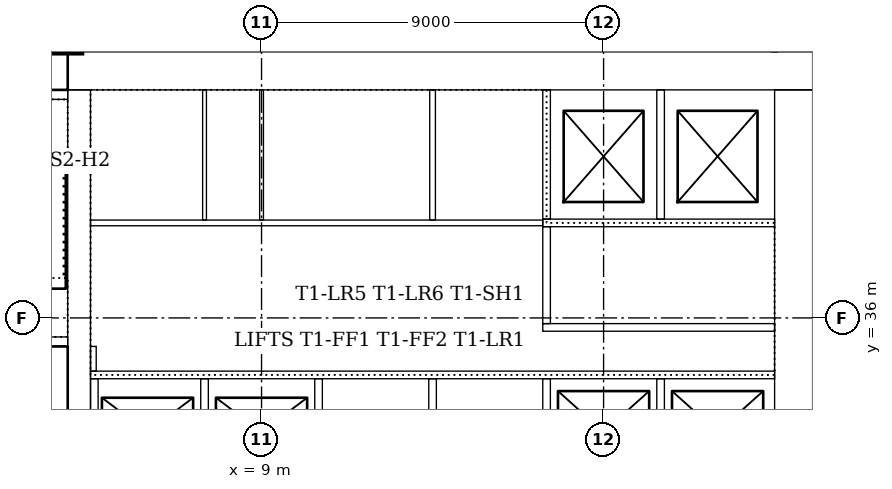
"""IFC4 building model, lengths in metres.
Left out: names, types, materials, properties, quantities, classifications, styles, units other than length and angle.
Written with IfcOpenShell. Run it as: python <this file> out.ifc"""

import sys

from ifc_helpers import new_model, si_unit, direction, frame, frame_2d, origin, origin_2d, place, context, subcontext, project, spatial, rectangle, extrude, element, fill, save


model = new_model("IFC4")
c1 = context("Model", 3, precision=1e-05, world=origin(), true_north=direction((0.0, 1.0)))
c2 = subcontext(c1, "Body", "Model", "MODEL_VIEW")
j1 = project(units=[si_unit("LENGTHUNIT", "METRE"), si_unit("PLANEANGLEUNIT", "RADIAN")], contexts=[c1])
p1 = place(None, origin())
s1 = spatial("IfcSite", under=j1, at=p1, CompositionType="ELEMENT")
p2 = place(p1, origin())
s2 = spatial("IfcBuilding", under=s1, at=p2, CompositionType="ELEMENT")
p3 = place(p2, frame((0.0, 0.0, 26.0)))
s3 = spatial("IfcBuildingStorey", under=s2, at=p3, CompositionType="ELEMENT", Elevation=26.0)
p4 = place(p3, frame((23.5, 42.5, 0.0), z_axis=(0.0, 0.0, 1.0), x_axis=(-1.0, 0.0, 0.0)))
e1 = element("IfcWall", 1, at=p4, inside=s3, PredefinedType="SOLIDWALL", context=c2, shape_type="SweptSolid", body=[
    extrude(rectangle(XDim=19.6, YDim=1.0, at=frame_2d((9.8, 0.0))), origin(), (0.0, 0.0, 1.0), 4.0),
])
p5 = place(p3, frame((23.0, 31.5, 0.0), z_axis=(0.0, 0.0, 1.0), x_axis=(0.0, 1.0, 0.0)))
e2 = element("IfcWall", 2, at=p5, inside=s3, PredefinedType="SOLIDWALL", context=c2, shape_type="SweptSolid", body=[
    extrude(rectangle(XDim=10.5, YDim=1.0, at=frame_2d((5.25, 0.0))), origin(), (0.0, 0.0, 1.0), 4.0),
])
p6 = place(p5, frame((3.15, 0.0, 0.0)))
e3 = element("IfcOpeningElement", 3, at=p6, cuts=e2, PredefinedType="OPENING", context=c2, shape_type="SweptSolid", body=[
    extrude(rectangle(XDim=1.0, YDim=2.1, at=frame_2d((0.5, 1.05))), frame((0.0, 0.51, 0.0), z_axis=(0.0, -1.0, 0.0), x_axis=(1.0, 0.0, 0.0)), (0.0, 0.0, 1.0), 1.02),
])
p7 = place(p5, frame((5.2, 0.0, 0.0)))
e4 = element("IfcOpeningElement", 4, at=p7, cuts=e2, PredefinedType="OPENING", context=c2, shape_type="SweptSolid", body=[
    extrude(rectangle(XDim=1.0, YDim=2.1, at=frame_2d((0.5, 1.05))), frame((0.0, 0.51, 0.0), z_axis=(0.0, -1.0, 0.0), x_axis=(1.0, 0.0, 0.0)), (0.0, 0.0, 1.0), 1.02),
])
p8 = place(p3, frame((4.2, 42.0, 0.0), z_axis=(0.0, 0.0, 1.0), x_axis=(0.0, -1.0, 0.0)))
e5 = element("IfcWall", 5, at=p8, inside=s3, PredefinedType="SOLIDWALL", context=c2, shape_type="SweptSolid", body=[
    extrude(rectangle(XDim=10.5, YDim=0.6, at=frame_2d((5.25, 0.0))), origin(), (0.0, 0.0, 1.0), 4.0),
])
p9 = place(p8, frame((5.3, 0.0, 0.0)))
e6 = element("IfcOpeningElement", 6, at=p9, cuts=e5, PredefinedType="OPENING", context=c2, shape_type="SweptSolid", body=[
    extrude(rectangle(XDim=1.0, YDim=2.1, at=frame_2d((0.5, 1.05))), frame((0.0, 0.31, 0.0), z_axis=(0.0, -1.0, 0.0), x_axis=(1.0, 0.0, 0.0)), (0.0, 0.0, 1.0), 0.62),
])
p10 = place(p3, frame((0.36, 35.375, 0.0), z_axis=(0.0, 0.0, 1.0), x_axis=(1.0, 0.0, 0.0)))
e7 = element("IfcWall", 7, at=p10, inside=s3, PredefinedType="SOLIDWALL", context=c2, shape_type="SweptSolid", body=[
    extrude(rectangle(XDim=3.54, YDim=0.25, at=frame_2d((1.77, 0.0))), origin(), (0.0, 0.0, 1.0), 4.0),
])
p11 = place(p10, frame((2.14, 0.0, 0.0)))
e8 = element("IfcOpeningElement", 8, at=p11, cuts=e7, PredefinedType="OPENING", context=c2, shape_type="SweptSolid", body=[
    extrude(rectangle(XDim=1.0, YDim=2.1, at=frame_2d((0.5, 1.05))), frame((0.0, 0.135, 0.0), z_axis=(0.0, -1.0, 0.0), x_axis=(1.0, 0.0, 0.0)), (0.0, 0.0, 1.0), 0.27),
])
p12 = place(p3, frame((3.9, 41.875, 0.0), z_axis=(0.0, 0.0, 1.0), x_axis=(-1.0, 0.0, 0.0)))
e9 = element("IfcWall", 9, at=p12, inside=s3, PredefinedType="SOLIDWALL", context=c2, shape_type="SweptSolid", body=[
    extrude(rectangle(XDim=3.54, YDim=0.25, at=frame_2d((1.77, 0.0))), origin(), (0.0, 0.0, 1.0), 4.0),
])
p13 = place(p3, frame((3.667, 43.574, 0.0), z_axis=(0.0, 0.0, 1.0), x_axis=(1.0, 0.0, 0.0)))
e10 = element("IfcColumn", 10, at=p13, inside=s3, PredefinedType="COLUMN", context=c2, shape_type="SweptSolid", body=[
    extrude(rectangle(XDim=1.2, YDim=1.2, at=origin_2d()), origin(), (0.0, 0.0, 1.0), 3.85),
])
p14 = place(p3, frame((16.4, 35.75, 0.0), z_axis=(0.0, 0.0, 1.0), x_axis=(1.0, 0.0, 0.0)))
e11 = element("IfcWall", 11, at=p14, inside=s3, PredefinedType="PARTITIONING", context=c2, shape_type="SweptSolid", body=[
    extrude(rectangle(XDim=6.1, YDim=0.2, at=frame_2d((3.05, 0.0))), origin(), (0.0, 0.0, 1.0), 3.85),
])
p15 = place(p3, frame((16.4, 38.5, 0.0), z_axis=(0.0, 0.0, 1.0), x_axis=(1.0, 0.0, 0.0)))
e12 = element("IfcWall", 12, at=p15, inside=s3, PredefinedType="PARTITIONING", context=c2, shape_type="SweptSolid", body=[
    extrude(rectangle(XDim=6.1, YDim=0.2, at=frame_2d((3.05, 0.0))), origin(), (0.0, 0.0, 1.0), 3.85),
])
p16 = place(p15, frame((1.0, 0.0, 0.0)))
e13 = element("IfcOpeningElement", 13, at=p16, cuts=e12, PredefinedType="OPENING", context=c2, shape_type="SweptSolid", body=[
    extrude(rectangle(XDim=1.2, YDim=2.1, at=frame_2d((0.6, 1.05))), frame((0.0, 0.11, 0.0), z_axis=(0.0, -1.0, 0.0), x_axis=(1.0, 0.0, 0.0)), (0.0, 0.0, 1.0), 0.22),
])
p17 = place(p15, frame((4.0, 0.0, 0.0)))
e14 = element("IfcOpeningElement", 14, at=p17, cuts=e12, PredefinedType="OPENING", context=c2, shape_type="SweptSolid", body=[
    extrude(rectangle(XDim=1.2, YDim=2.1, at=frame_2d((0.6, 1.05))), frame((0.0, 0.11, 0.0), z_axis=(0.0, -1.0, 0.0), x_axis=(1.0, 0.0, 0.0)), (0.0, 0.0, 1.0), 0.22),
])
p18 = place(p3, frame((16.5, 35.85, 0.0), z_axis=(0.0, 0.0, 1.0), x_axis=(0.0, 1.0, 0.0)))
e15 = element("IfcWall", 15, at=p18, inside=s3, PredefinedType="PARTITIONING", context=c2, shape_type="SweptSolid", body=[
    extrude(rectangle(XDim=2.55, YDim=0.2, at=frame_2d((1.275, 0.0))), origin(), (0.0, 0.0, 1.0), 3.85),
])
p19 = place(p3, frame((4.5, 34.5, 0.0), z_axis=(0.0, 0.0, 1.0), x_axis=(1.0, 0.0, 0.0)))
e16 = element("IfcWall", 16, at=p19, inside=s3, PredefinedType="PARTITIONING", context=c2, shape_type="SweptSolid", body=[
    extrude(rectangle(XDim=18.0, YDim=0.2, at=frame_2d((9.0, 0.0))), origin(), (0.0, 0.0, 1.0), 3.85),
])
p20 = place(p19, frame((0.95, 0.0, 0.0)))
e17 = element("IfcOpeningElement", 17, at=p20, cuts=e16, PredefinedType="OPENING", context=c2, shape_type="SweptSolid", body=[
    extrude(rectangle(XDim=1.1, YDim=2.1, at=frame_2d((0.55, 1.05))), frame((0.0, 0.11, 0.0), z_axis=(0.0, -1.0, 0.0), x_axis=(1.0, 0.0, 0.0)), (0.0, 0.0, 1.0), 0.22),
])
p21 = place(p19, frame((3.95, 0.0, 0.0)))
e18 = element("IfcOpeningElement", 18, at=p21, cuts=e16, PredefinedType="OPENING", context=c2, shape_type="SweptSolid", body=[
    extrude(rectangle(XDim=1.1, YDim=2.1, at=frame_2d((0.55, 1.05))), frame((0.0, 0.11, 0.0), z_axis=(0.0, -1.0, 0.0), x_axis=(1.0, 0.0, 0.0)), (0.0, 0.0, 1.0), 0.22),
])
p22 = place(p19, frame((12.95, 0.0, 0.0)))
e19 = element("IfcOpeningElement", 19, at=p22, cuts=e16, PredefinedType="OPENING", context=c2, shape_type="SweptSolid", body=[
    extrude(rectangle(XDim=1.1, YDim=2.1, at=frame_2d((0.55, 1.05))), frame((0.0, 0.11, 0.0), z_axis=(0.0, -1.0, 0.0), x_axis=(1.0, 0.0, 0.0)), (0.0, 0.0, 1.0), 0.22),
])
p23 = place(p19, frame((15.95, 0.0, 0.0)))
e20 = element("IfcOpeningElement", 20, at=p23, cuts=e16, PredefinedType="OPENING", context=c2, shape_type="SweptSolid", body=[
    extrude(rectangle(XDim=1.1, YDim=2.1, at=frame_2d((0.55, 1.05))), frame((0.0, 0.11, 0.0), z_axis=(0.0, -1.0, 0.0), x_axis=(1.0, 0.0, 0.0)), (0.0, 0.0, 1.0), 0.22),
])
for number, where, z_axis, x_axis in (
    (21, (16.5, 38.6, 0.0), (0.0, 0.0, 1.0), (0.0, 1.0, 0.0)),
    (22, (19.5, 38.6, 0.0), (0.0, 0.0, 1.0), (0.0, 1.0, 0.0)),
):
    element("IfcWall", number, at=place(p3, frame(where, z_axis=z_axis, x_axis=x_axis)), inside=s3, PredefinedType="PARTITIONING", context=c2, shape_type="SweptSolid", body=[
        extrude(rectangle(XDim=3.4, YDim=0.2, at=frame_2d((1.7, 0.0))), origin(), (0.0, 0.0, 1.0), 3.85),
    ])
for number, where, z_axis, x_axis in (
    (23, (4.6, 31.75, 0.0), (0.0, 0.0, 1.0), (0.0, 1.0, 0.0)),
    (24, (7.5, 31.75, 0.0), (0.0, 0.0, 1.0), (0.0, 1.0, 0.0)),
    (25, (10.5, 31.75, 0.0), (0.0, 0.0, 1.0), (0.0, 1.0, 0.0)),
    (26, (13.5, 31.75, 0.0), (0.0, 0.0, 1.0), (0.0, 1.0, 0.0)),
    (27, (16.5, 31.75, 0.0), (0.0, 0.0, 1.0), (0.0, 1.0, 0.0)),
    (28, (19.5, 31.75, 0.0), (0.0, 0.0, 1.0), (0.0, 1.0, 0.0)),
):
    element("IfcWall", number, at=place(p3, frame(where, z_axis=z_axis, x_axis=x_axis)), inside=s3, PredefinedType="PARTITIONING", context=c2, shape_type="SweptSolid", body=[
        extrude(rectangle(XDim=2.65, YDim=0.2, at=frame_2d((1.325, 0.0))), origin(), (0.0, 0.0, 1.0), 3.85),
    ])
p24 = place(p3, frame((4.5, 38.5, 0.0), z_axis=(0.0, 0.0, 1.0), x_axis=(1.0, 0.0, 0.0)))
e29 = element("IfcWall", 29, at=p24, inside=s3, PredefinedType="PARTITIONING", context=c2, shape_type="SweptSolid", body=[
    extrude(rectangle(XDim=11.9, YDim=0.15, at=frame_2d((5.95, 0.0))), origin(), (0.0, 0.0, 1.0), 3.85),
])
p25 = place(p24, frame((1.1, 0.0, 0.0)))
e30 = element("IfcOpeningElement", 30, at=p25, cuts=e29, PredefinedType="OPENING", context=c2, shape_type="SweptSolid", body=[
    extrude(rectangle(XDim=0.9, YDim=2.1, at=frame_2d((0.45, 1.05))), frame((0.0, 0.085, 0.0), z_axis=(0.0, -1.0, 0.0), x_axis=(1.0, 0.0, 0.0)), (0.0, 0.0, 1.0), 0.17),
])
p26 = place(p24, frame((3.3, 0.0, 0.0)))
e31 = element("IfcOpeningElement", 31, at=p26, cuts=e29, PredefinedType="OPENING", context=c2, shape_type="SweptSolid", body=[
    extrude(rectangle(XDim=0.9, YDim=2.1, at=frame_2d((0.45, 1.05))), frame((0.0, 0.085, 0.0), z_axis=(0.0, -1.0, 0.0), x_axis=(1.0, 0.0, 0.0)), (0.0, 0.0, 1.0), 0.17),
])
p27 = place(p24, frame((6.3, 0.0, 0.0)))
e32 = element("IfcOpeningElement", 32, at=p27, cuts=e29, PredefinedType="OPENING", context=c2, shape_type="SweptSolid", body=[
    extrude(rectangle(XDim=0.9, YDim=2.1, at=frame_2d((0.45, 1.05))), frame((0.0, 0.085, 0.0), z_axis=(0.0, -1.0, 0.0), x_axis=(1.0, 0.0, 0.0)), (0.0, 0.0, 1.0), 0.17),
])
p28 = place(p24, frame((9.95, 0.0, 0.0)))
e33 = element("IfcOpeningElement", 33, at=p28, cuts=e29, PredefinedType="OPENING", context=c2, shape_type="SweptSolid", body=[
    extrude(rectangle(XDim=0.8, YDim=2.1, at=frame_2d((0.4, 1.05))), frame((0.0, 0.085, 0.0), z_axis=(0.0, -1.0, 0.0), x_axis=(1.0, 0.0, 0.0)), (0.0, 0.0, 1.0), 0.17),
])
p29 = place(p3, frame((4.575, 34.6, 0.0), z_axis=(0.0, 0.0, 1.0), x_axis=(0.0, 1.0, 0.0)))
e34 = element("IfcWall", 34, at=p29, inside=s3, PredefinedType="PARTITIONING", context=c2, shape_type="SweptSolid", body=[
    extrude(rectangle(XDim=0.65, YDim=0.15, at=frame_2d((0.325, 0.0))), origin(), (0.0, 0.0, 1.0), 3.85),
])
p30 = place(p3, frame((13.5, 38.575, 0.0), z_axis=(0.0, 0.0, 1.0), x_axis=(0.0, 1.0, 0.0)))
e35 = element("IfcWall", 35, at=p30, inside=s3, PredefinedType="PARTITIONING", context=c2, shape_type="SweptSolid", body=[
    extrude(rectangle(XDim=3.425, YDim=0.15, at=frame_2d((1.712, 0.0))), origin(), (0.0, 0.0, 1.0), 3.85),
])
for number, where, z_axis, x_axis in (
    (36, (7.5, 38.575, 0.0), (0.0, 0.0, 1.0), (0.0, 1.0, 0.0)),
    (37, (9.0, 38.575, 0.0), (0.0, 0.0, 1.0), (0.0, 1.0, 0.0)),
):
    element("IfcWall", number, at=place(p3, frame(where, z_axis=z_axis, x_axis=x_axis)), inside=s3, PredefinedType="PARTITIONING", context=c2, shape_type="SweptSolid", body=[
        extrude(rectangle(XDim=3.425, YDim=0.1, at=frame_2d((1.712, 0.0))), origin(), (0.0, 0.0, 1.0), 3.85),
    ])
p31 = place(p9, frame((1.0, 0.0, 0.0), z_axis=(0.0, 0.0, 1.0), x_axis=(-1.0, 0.0, 0.0)))
e38 = element("IfcDoor", 38, at=p31, inside=s3, OperationType="SINGLE_SWING_LEFT", PredefinedType="DOOR", context=c2, shape_type="SweptSolid", body=[
    extrude(rectangle(XDim=1.0, YDim=2.1, at=frame_2d((0.5, 1.05))), frame((0.0, 0.025, 0.0), z_axis=(0.0, -1.0, 0.0), x_axis=(1.0, 0.0, 0.0)), (0.0, 0.0, 1.0), 0.05),
])
fill(e6, e38)
p32 = place(p20, origin())
e39 = element("IfcDoor", 39, at=p32, inside=s3, OperationType="SLIDING_TO_LEFT", PredefinedType="DOOR", context=c2, shape_type="SweptSolid", body=[
    extrude(rectangle(XDim=1.1, YDim=2.1, at=frame_2d((0.55, 1.05))), frame((0.0, 0.025, 0.0), z_axis=(0.0, -1.0, 0.0), x_axis=(1.0, 0.0, 0.0)), (0.0, 0.0, 1.0), 0.05),
])
fill(e17, e39)
p33 = place(p21, origin())
e40 = element("IfcDoor", 40, at=p33, inside=s3, OperationType="SLIDING_TO_LEFT", PredefinedType="DOOR", context=c2, shape_type="SweptSolid", body=[
    extrude(rectangle(XDim=1.1, YDim=2.1, at=frame_2d((0.55, 1.05))), frame((0.0, 0.025, 0.0), z_axis=(0.0, -1.0, 0.0), x_axis=(1.0, 0.0, 0.0)), (0.0, 0.0, 1.0), 0.05),
])
fill(e18, e40)
p34 = place(p22, origin())
e41 = element("IfcDoor", 41, at=p34, inside=s3, OperationType="SLIDING_TO_LEFT", PredefinedType="DOOR", context=c2, shape_type="SweptSolid", body=[
    extrude(rectangle(XDim=1.1, YDim=2.1, at=frame_2d((0.55, 1.05))), frame((0.0, 0.025, 0.0), z_axis=(0.0, -1.0, 0.0), x_axis=(1.0, 0.0, 0.0)), (0.0, 0.0, 1.0), 0.05),
])
fill(e19, e41)
p35 = place(p23, origin())
e42 = element("IfcDoor", 42, at=p35, inside=s3, OperationType="SLIDING_TO_LEFT", PredefinedType="DOOR", context=c2, shape_type="SweptSolid", body=[
    extrude(rectangle(XDim=1.1, YDim=2.1, at=frame_2d((0.55, 1.05))), frame((0.0, 0.025, 0.0), z_axis=(0.0, -1.0, 0.0), x_axis=(1.0, 0.0, 0.0)), (0.0, 0.0, 1.0), 0.05),
])
fill(e20, e42)
p36 = place(p16, origin())
e43 = element("IfcDoor", 43, at=p36, inside=s3, OperationType="SLIDING_TO_LEFT", PredefinedType="DOOR", context=c2, shape_type="SweptSolid", body=[
    extrude(rectangle(XDim=1.2, YDim=2.1, at=frame_2d((0.6, 1.05))), frame((0.0, 0.025, 0.0), z_axis=(0.0, -1.0, 0.0), x_axis=(1.0, 0.0, 0.0)), (0.0, 0.0, 1.0), 0.05),
])
fill(e13, e43)
p37 = place(p17, origin())
e44 = element("IfcDoor", 44, at=p37, inside=s3, OperationType="SLIDING_TO_LEFT", PredefinedType="DOOR", context=c2, shape_type="SweptSolid", body=[
    extrude(rectangle(XDim=1.2, YDim=2.1, at=frame_2d((0.6, 1.05))), frame((0.0, 0.025, 0.0), z_axis=(0.0, -1.0, 0.0), x_axis=(1.0, 0.0, 0.0)), (0.0, 0.0, 1.0), 0.05),
])
fill(e14, e44)
p38 = place(p6, origin())
e45 = element("IfcDoor", 45, at=p38, inside=s3, OperationType="SINGLE_SWING_RIGHT", PredefinedType="DOOR", context=c2, shape_type="SweptSolid", body=[
    extrude(rectangle(XDim=1.0, YDim=2.1, at=frame_2d((0.5, 1.05))), frame((0.0, 0.025, 0.0), z_axis=(0.0, -1.0, 0.0), x_axis=(1.0, 0.0, 0.0)), (0.0, 0.0, 1.0), 0.05),
])
fill(e3, e45)
p39 = place(p7, origin())
e46 = element("IfcDoor", 46, at=p39, inside=s3, OperationType="SINGLE_SWING_LEFT", PredefinedType="DOOR", context=c2, shape_type="SweptSolid", body=[
    extrude(rectangle(XDim=1.0, YDim=2.1, at=frame_2d((0.5, 1.05))), frame((0.0, 0.025, 0.0), z_axis=(0.0, -1.0, 0.0), x_axis=(1.0, 0.0, 0.0)), (0.0, 0.0, 1.0), 0.05),
])
fill(e4, e46)
p40 = place(p25, origin())
e47 = element("IfcDoor", 47, at=p40, inside=s3, OperationType="SINGLE_SWING_RIGHT", PredefinedType="DOOR", context=c2, shape_type="SweptSolid", body=[
    extrude(rectangle(XDim=0.9, YDim=2.1, at=frame_2d((0.45, 1.05))), frame((0.0, 0.025, 0.0), z_axis=(0.0, -1.0, 0.0), x_axis=(1.0, 0.0, 0.0)), (0.0, 0.0, 1.0), 0.05),
])
fill(e30, e47)
p41 = place(p26, origin())
e48 = element("IfcDoor", 48, at=p41, inside=s3, OperationType="SINGLE_SWING_RIGHT", PredefinedType="DOOR", context=c2, shape_type="SweptSolid", body=[
    extrude(rectangle(XDim=0.9, YDim=2.1, at=frame_2d((0.45, 1.05))), frame((0.0, 0.025, 0.0), z_axis=(0.0, -1.0, 0.0), x_axis=(1.0, 0.0, 0.0)), (0.0, 0.0, 1.0), 0.05),
])
fill(e31, e48)
p42 = place(p27, origin())
e49 = element("IfcDoor", 49, at=p42, inside=s3, OperationType="SINGLE_SWING_LEFT", PredefinedType="DOOR", context=c2, shape_type="SweptSolid", body=[
    extrude(rectangle(XDim=0.9, YDim=2.1, at=frame_2d((0.45, 1.05))), frame((0.0, 0.025, 0.0), z_axis=(0.0, -1.0, 0.0), x_axis=(1.0, 0.0, 0.0)), (0.0, 0.0, 1.0), 0.05),
])
fill(e32, e49)
p43 = place(p28, origin())
e50 = element("IfcDoor", 50, at=p43, inside=s3, OperationType="SINGLE_SWING_RIGHT", PredefinedType="DOOR", context=c2, shape_type="SweptSolid", body=[
    extrude(rectangle(XDim=0.8, YDim=2.1, at=frame_2d((0.4, 1.05))), frame((0.0, 0.025, 0.0), z_axis=(0.0, -1.0, 0.0), x_axis=(1.0, 0.0, 0.0)), (0.0, 0.0, 1.0), 0.05),
])
fill(e33, e50)
save(model, sys.argv[1])
